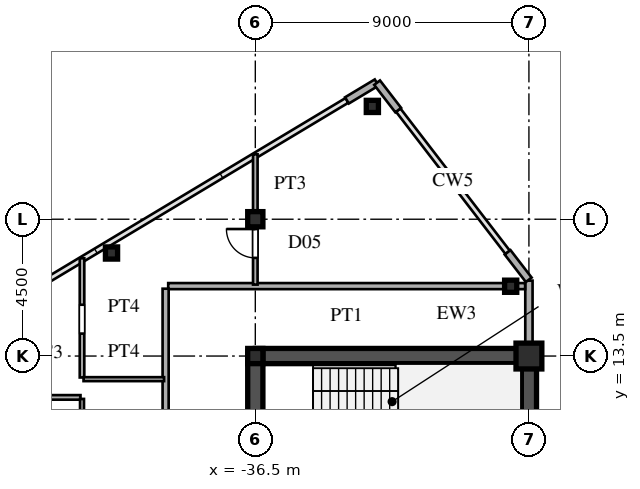
"""IFC4 building model, lengths in metres.
Left out: names, types, materials, properties, quantities, classifications, styles, units other than length and angle.
Written with IfcOpenShell. Run it as: python <this file> out.ifc"""

import sys

from ifc_helpers import new_model, si_unit, direction, frame, frame_2d, origin, origin_2d, place, context, subcontext, project, spatial, rectangle, hollow_rectangle, i_section, extrude, source, transform, mapped, element, fill, save


model = new_model("IFC4")
c1 = context("Model", 3, precision=1e-05, world=origin(), true_north=direction((0.0, 1.0)))
c2 = subcontext(c1, "Body", "Model", "MODEL_VIEW")
j1 = project(units=[si_unit("LENGTHUNIT", "METRE"), si_unit("PLANEANGLEUNIT", "RADIAN")], contexts=[c1])
p1 = place(None, origin())
s1 = spatial("IfcSite", under=j1, at=p1, CompositionType="ELEMENT")
p2 = place(p1, origin())
s2 = spatial("IfcBuilding", under=s1, at=p2, CompositionType="ELEMENT")
p3 = place(p2, frame((0.0, 0.0, 213.9)))
s3 = spatial("IfcBuildingStorey", under=s2, at=p3, CompositionType="ELEMENT", Elevation=213.9)
m1 = source(origin(), c2, "Body", "SweptSolid", [
    extrude(hollow_rectangle(XDim=0.85, YDim=0.85, WallThickness=0.036, at=origin_2d()), origin(), (0.0, 0.0, 1.0), 3.6),
])
p4 = place(p3, frame((-27.5, 13.5, 0.0), z_axis=(0.0, 0.0, 1.0), x_axis=(1.0, 0.0, 0.0)))
e1 = element("IfcColumn", 1, at=p4, inside=s3, PredefinedType="COLUMN", context=c2, shape_type="MappedRepresentation", body=[
    mapped(m1, transform((0.0, 0.0, 0.0), scale=1.0)),
])
m2 = source(origin(), c2, "Body", "SweptSolid", [
    extrude(i_section(OverallWidth=0.5, OverallDepth=0.5, WebThickness=0.02, FlangeThickness=0.032, at=origin_2d()), origin(), (0.0, 0.0, 1.0), 3.6),
])
for number, where, z_axis, x_axis in (
    (2, (-36.5, 13.5, 0.0), (0.0, 0.0, 1.0), (1.0, 0.0, 0.0)),
    (3, (-36.5, 18.0, 0.0), (0.0, 0.0, 1.0), (1.0, 0.0, 0.0)),
):
    element("IfcColumn", number, at=place(p3, frame(where, z_axis=z_axis, x_axis=x_axis)), inside=s3, PredefinedType="COLUMN", context=c2, shape_type="MappedRepresentation", body=[
        mapped(m2, transform((0.0, 0.0, 0.0), scale=1.0)),
    ])
m3 = source(origin(), c2, "Body", "SweptSolid", [
    extrude(hollow_rectangle(XDim=0.4, YDim=0.4, WallThickness=0.016, at=origin_2d()), origin(), (0.0, 0.0, 1.0), 3.6),
])
for number, where, z_axis, x_axis in (
    (4, (-28.1, 15.796, 0.0), (0.0, 0.0, 1.0), (1.0, 0.0, 0.0)),
    (5, (-32.65, 21.71, 0.0), (0.0, 0.0, 1.0), (1.0, 0.0, 0.0)),
    (6, (-41.23, 16.889, 0.0), (0.0, 0.0, 1.0), (1.0, 0.0, 0.0)),
):
    element("IfcColumn", number, at=place(p3, frame(where, z_axis=z_axis, x_axis=x_axis)), inside=s3, PredefinedType="COLUMN", context=c2, shape_type="MappedRepresentation", body=[
        mapped(m3, transform((0.0, 0.0, 0.0), scale=1.0)),
    ])
p5 = place(p3, frame((-27.5, 13.755, 0.0), z_axis=(0.0, 0.0, 1.0), x_axis=(0.0, 1.0, 0.0)))
e7 = element("IfcWall", 7, at=p5, inside=s3, PredefinedType="SOLIDWALL", context=c2, shape_type="SweptSolid", body=[
    extrude(rectangle(XDim=0.62, YDim=0.24, at=frame_2d((0.31, 0.0))), origin(), (0.0, 0.0, 1.0), 2.88),
])
p6 = place(p3, frame((-27.5, 14.375, 0.0), z_axis=(0.0, 0.0, 1.0), x_axis=(0.0, 1.0, 0.0)))
e8 = element("IfcWall", 8, at=p6, inside=s3, PredefinedType="SOLIDWALL", context=c2, shape_type="SweptSolid", body=[
    extrude(rectangle(XDim=1.605, YDim=0.24, at=frame_2d((0.803, 0.0))), origin(), (0.0, 0.0, 1.0), 3.38),
])
for number, where, z_axis, x_axis in (
    (9, (-27.506, 16.008, 0.0), (0.0, 0.0, 1.0), (-0.61, 0.793, 0.0)),
    (10, (-31.799, 21.588, 0.0), (0.0, 0.0, 1.0), (-0.61, 0.793, 0.0)),
    (11, (-32.509, 22.495, 0.0), (0.0, 0.0, 1.0), (-0.857, -0.515, 0.0)),
):
    element("IfcWall", number, at=place(p3, frame(where, z_axis=z_axis, x_axis=x_axis)), inside=s3, PredefinedType="SOLIDWALL", context=c2, shape_type="SweptSolid", body=[
        extrude(rectangle(XDim=1.14, YDim=0.24, at=frame_2d((0.57, 0.0))), origin(), (0.0, 0.0, 1.0), 3.38),
    ])
p7 = place(p3, frame((-27.5, 1.3, 0.0), z_axis=(0.0, 0.0, 1.0), x_axis=(0.0, 1.0, 0.0)))
e12 = element("IfcWall", 12, at=p7, inside=s3, PredefinedType="SHEAR", context=c2, shape_type="SweptSolid", body=[
    extrude(rectangle(XDim=12.2, YDim=0.5, at=frame_2d((6.1, 0.0))), origin(), (0.0, 0.0, 1.0), 3.38),
])
p8 = place(p3, frame((-36.5, 13.5, 0.0), z_axis=(0.0, 0.0, 1.0), x_axis=(1.0, 0.0, 0.0)))
e13 = element("IfcWall", 13, at=p8, inside=s3, PredefinedType="SHEAR", context=c2, shape_type="SweptSolid", body=[
    extrude(rectangle(XDim=9.0, YDim=0.5, at=frame_2d((4.5, 0.0))), origin(), (0.0, 0.0, 1.0), 3.38),
])
p9 = place(p3, frame((-36.5, 8.2, 0.0), z_axis=(0.0, 0.0, 1.0), x_axis=(0.0, 1.0, 0.0)))
e14 = element("IfcWall", 14, at=p9, inside=s3, PredefinedType="SHEAR", context=c2, shape_type="SweptSolid", body=[
    extrude(rectangle(XDim=5.45, YDim=0.5, at=frame_2d((2.725, 0.0))), origin(), (0.0, 0.0, 1.0), 3.38),
])
p10 = place(p9, frame((0.245, 0.0, 0.0)))
e15 = element("IfcOpeningElement", 15, at=p10, cuts=e14, PredefinedType="OPENING", context=c2, shape_type="SweptSolid", body=[
    extrude(rectangle(XDim=0.95, YDim=2.15, at=frame_2d((0.475, 1.075))), frame((0.0, 0.26, 0.0), z_axis=(0.0, -1.0, 0.0), x_axis=(1.0, 0.0, 0.0)), (0.0, 0.0, 1.0), 0.52),
])
p11 = place(p3, frame((-49.802, 12.14, 0.0), z_axis=(0.0, 0.0, 1.0), x_axis=(1.0, 0.0, 0.0)))
e16 = element("IfcWall", 16, at=p11, inside=s3, PredefinedType="PARTITIONING", context=c2, shape_type="SweptSolid", body=[
    extrude(rectangle(XDim=7.552, YDim=0.15, at=frame_2d((3.776, 0.0))), origin(), (0.0, 0.0, 1.0), 3.38),
])
p12 = place(p11, frame((3.002, 0.0, 0.0)))
e17 = element("IfcOpeningElement", 17, at=p12, cuts=e16, PredefinedType="OPENING", context=c2, shape_type="SweptSolid", body=[
    extrude(rectangle(XDim=0.95, YDim=2.15, at=frame_2d((0.475, 1.075))), frame((0.0, 0.085, 0.0), z_axis=(0.0, -1.0, 0.0), x_axis=(1.0, 0.0, 0.0)), (0.0, 0.0, 1.0), 0.17),
])
p13 = place(p3, frame((-42.15, 12.74, 0.0), z_axis=(0.0, 0.0, 1.0), x_axis=(1.0, 0.0, 0.0)))
e18 = element("IfcWall", 18, at=p13, inside=s3, PredefinedType="PARTITIONING", context=c2, shape_type="SweptSolid", body=[
    extrude(rectangle(XDim=2.65, YDim=0.13, at=frame_2d((1.325, 0.0))), origin(), (0.0, 0.0, 1.0), 3.38),
])
p14 = place(p3, frame((-39.365, 15.8, 0.0), z_axis=(0.0, 0.0, 1.0), x_axis=(1.0, 0.0, 0.0)))
e19 = element("IfcWall", 19, at=p14, inside=s3, PredefinedType="PARTITIONING", context=c2, shape_type="SweptSolid", body=[
    extrude(rectangle(XDim=11.74, YDim=0.2, at=frame_2d((5.87, 0.0))), origin(), (0.0, 0.0, 1.0), 3.38),
])
p15 = place(p3, frame((-42.2, 3.812, 0.0), z_axis=(0.0, 0.0, 1.0), x_axis=(0.0, 1.0, 0.0)))
e20 = element("IfcWall", 20, at=p15, inside=s3, PredefinedType="PARTITIONING", context=c2, shape_type="SweptSolid", body=[
    extrude(rectangle(XDim=8.278, YDim=0.13, at=frame_2d((4.139, 0.0))), origin(), (0.0, 0.0, 1.0), 3.38),
])
p16 = place(p15, frame((4.71, 0.0, 0.0)))
e21 = element("IfcOpeningElement", 21, at=p16, cuts=e20, PredefinedType="OPENING", context=c2, shape_type="SweptSolid", body=[
    extrude(rectangle(XDim=0.95, YDim=2.15, at=frame_2d((0.475, 1.075))), frame((0.0, 0.075, 0.0), z_axis=(0.0, -1.0, 0.0), x_axis=(1.0, 0.0, 0.0)), (0.0, 0.0, 1.0), 0.15),
])
p17 = place(p3, frame((-42.2, 12.795, 0.0), z_axis=(0.0, 0.0, 1.0), x_axis=(0.0, 1.0, 0.0)))
e22 = element("IfcWall", 22, at=p17, inside=s3, PredefinedType="PARTITIONING", context=c2, shape_type="SweptSolid", body=[
    extrude(rectangle(XDim=3.92, YDim=0.15, at=frame_2d((1.96, 0.0))), origin(), (0.0, 0.0, 1.0), 3.38),
])
p18 = place(p17, frame((1.442, 0.0, 0.0)))
e23 = element("IfcOpeningElement", 23, at=p18, cuts=e22, PredefinedType="OPENING", context=c2, shape_type="SweptSolid", body=[
    extrude(rectangle(XDim=0.95, YDim=2.15, at=frame_2d((0.475, 1.075))), frame((0.0, 0.085, 0.0), z_axis=(0.0, -1.0, 0.0), x_axis=(1.0, 0.0, 0.0)), (0.0, 0.0, 1.0), 0.17),
])
p19 = place(p3, frame((-39.45, -15.715, 0.0), z_axis=(0.0, 0.0, 1.0), x_axis=(0.0, 1.0, 0.0)))
e24 = element("IfcWall", 24, at=p19, inside=s3, PredefinedType="PARTITIONING", context=c2, shape_type="SweptSolid", body=[
    extrude(rectangle(XDim=31.43, YDim=0.2, at=frame_2d((15.715, 0.0))), origin(), (0.0, 0.0, 1.0), 3.38),
])
p20 = place(p19, frame((4.69, 0.0, 0.0)))
e25 = element("IfcOpeningElement", 25, at=p20, cuts=e24, PredefinedType="OPENING", context=c2, shape_type="SweptSolid", body=[
    extrude(rectangle(XDim=1.05, YDim=2.25, at=frame_2d((0.525, 1.125))), frame((0.0, 0.11, 0.0), z_axis=(0.0, -1.0, 0.0), x_axis=(1.0, 0.0, 0.0)), (0.0, 0.0, 1.0), 0.22),
])
p21 = place(p19, frame((16.198, 0.0, 0.0)))
e26 = element("IfcOpeningElement", 26, at=p21, cuts=e24, PredefinedType="OPENING", context=c2, shape_type="SweptSolid", body=[
    extrude(rectangle(XDim=1.05, YDim=2.25, at=frame_2d((0.525, 1.125))), frame((0.0, 0.11, 0.0), z_axis=(0.0, -1.0, 0.0), x_axis=(1.0, 0.0, 0.0)), (0.0, 0.0, 1.0), 0.22),
])
p22 = place(p19, frame((24.188, 0.0, 0.0)))
e27 = element("IfcOpeningElement", 27, at=p22, cuts=e24, PredefinedType="OPENING", context=c2, shape_type="SweptSolid", body=[
    extrude(rectangle(XDim=1.05, YDim=2.25, at=frame_2d((0.525, 1.125))), frame((0.0, 0.11, 0.0), z_axis=(0.0, -1.0, 0.0), x_axis=(1.0, 0.0, 0.0)), (0.0, 0.0, 1.0), 0.22),
])
p23 = place(p3, frame((-36.5, 15.85, 0.0), z_axis=(0.0, 0.0, 1.0), x_axis=(0.0, 1.0, 0.0)))
e28 = element("IfcWall", 28, at=p23, inside=s3, PredefinedType="PARTITIONING", context=c2, shape_type="SweptSolid", body=[
    extrude(rectangle(XDim=4.285, YDim=0.15, at=frame_2d((2.143, 0.0))), origin(), (0.0, 0.0, 1.0), 2.78),
])
p24 = place(p23, frame((0.878, 0.0, 0.0)))
e29 = element("IfcOpeningElement", 29, at=p24, cuts=e28, PredefinedType="OPENING", context=c2, shape_type="SweptSolid", body=[
    extrude(rectangle(XDim=0.95, YDim=2.15, at=frame_2d((0.475, 1.075))), frame((0.0, 0.085, 0.0), z_axis=(0.0, -1.0, 0.0), x_axis=(1.0, 0.0, 0.0)), (0.0, 0.0, 1.0), 0.17),
])
m4 = source(origin(), c2, "Body", "SweptSolid", [
    extrude(rectangle(XDim=0.95, YDim=2.15, at=frame_2d((0.475, 1.075))), frame((0.0, 0.025, 0.0), z_axis=(0.0, -1.0, 0.0), x_axis=(1.0, 0.0, 0.0)), (0.0, 0.0, 1.0), 0.05),
])
p25 = place(p24, origin())
e30 = element("IfcDoor", 30, at=p25, inside=s3, OperationType="SINGLE_SWING_RIGHT", PredefinedType="DOOR", context=c2, shape_type="MappedRepresentation", body=[
    mapped(m4, transform((0.0, 0.0, 0.0), scale=1.0)),
])
fill(e29, e30)
save(model, sys.argv[1])
